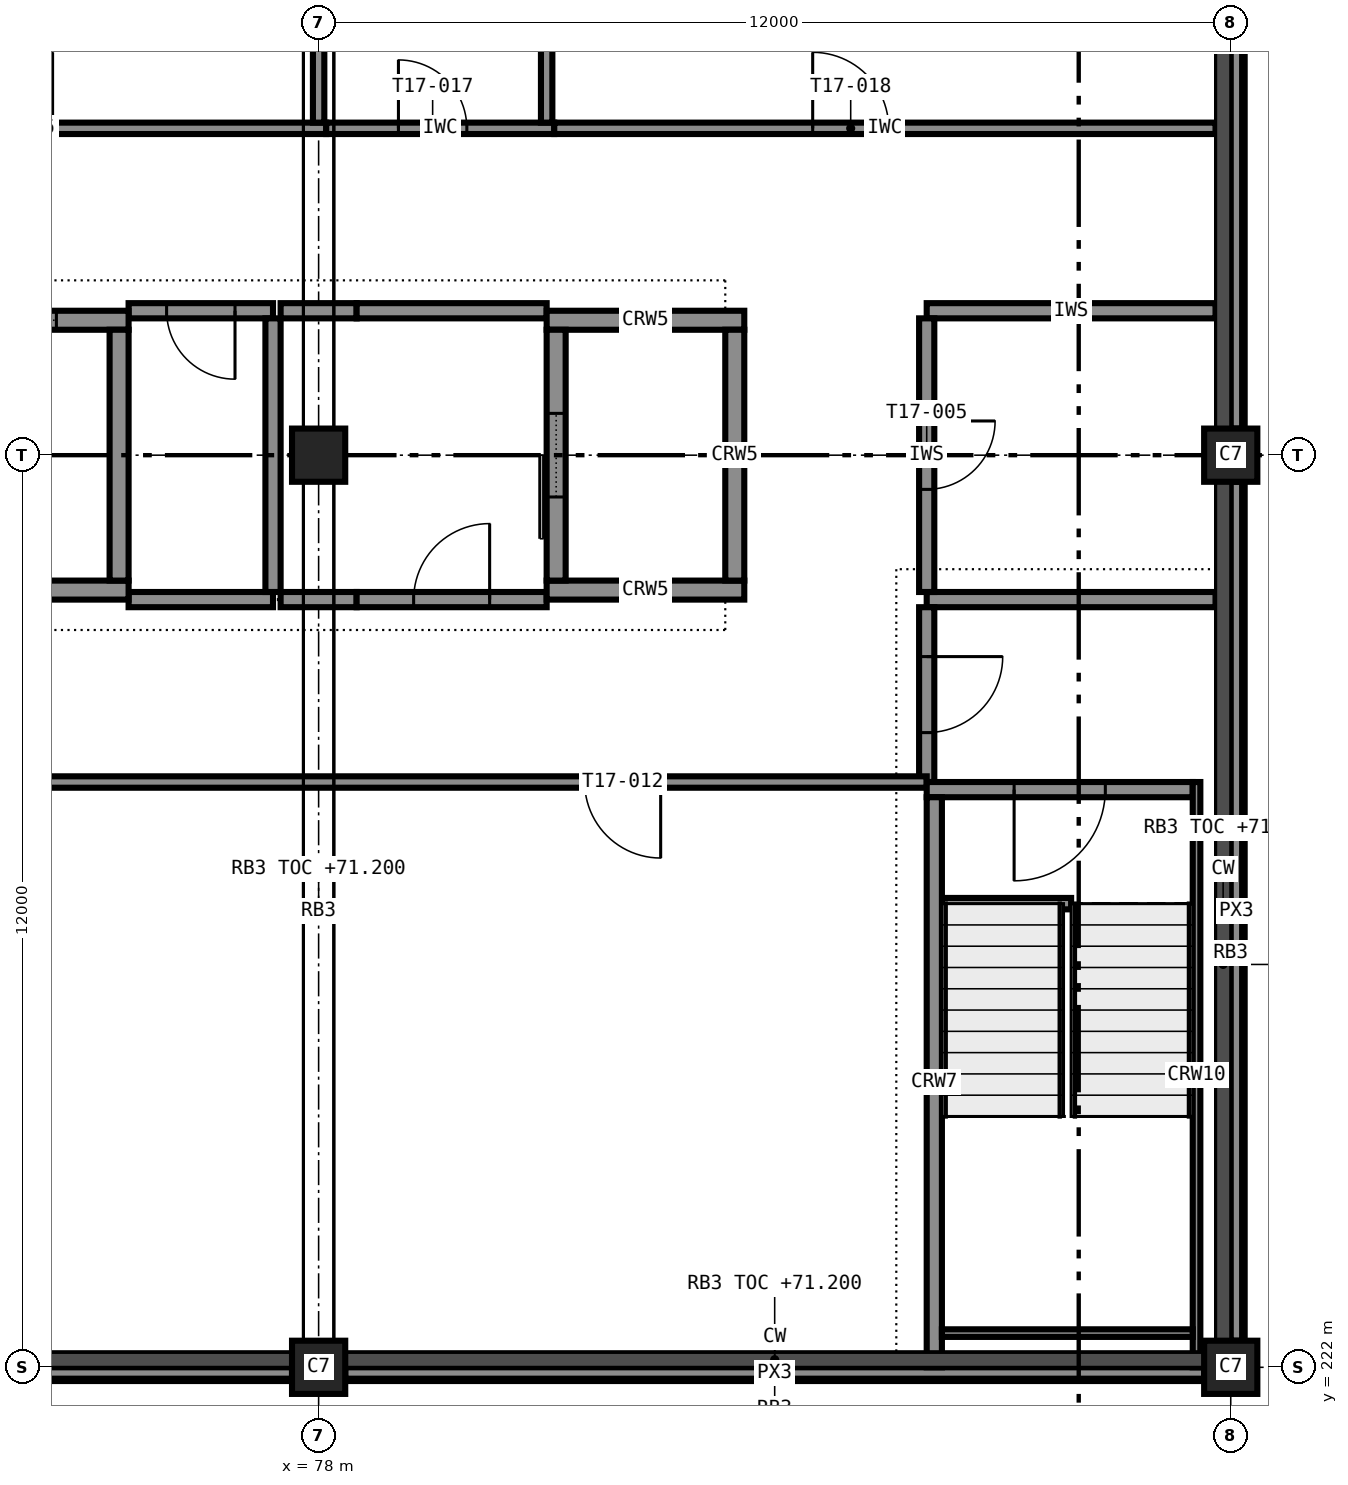
"""IFC4 building model, lengths in metres.
Left out: names, types, materials, properties, quantities, classifications, styles, units other than length and angle.
Written with IfcOpenShell. Run it as: python <this file> out.ifc"""

import sys

from ifc_helpers import new_model, si_unit, direction, frame, frame_2d, origin, origin_2d, place, context, subcontext, project, spatial, rectangle, extrude, element, fill, save


model = new_model("IFC4")
c1 = context("Model", 3, precision=1e-05, world=origin(), true_north=direction((0.0, 1.0)))
c2 = subcontext(c1, "Body", "Model", "MODEL_VIEW")
j1 = project(units=[si_unit("LENGTHUNIT", "METRE"), si_unit("PLANEANGLEUNIT", "RADIAN")], contexts=[c1])
p1 = place(None, origin())
s1 = spatial("IfcSite", under=j1, at=p1, CompositionType="ELEMENT")
p2 = place(p1, origin())
s2 = spatial("IfcBuilding", under=s1, at=p2, CompositionType="ELEMENT")
p3 = place(p2, frame((0.0, 0.0, 67.8)))
s3 = spatial("IfcBuildingStorey", under=s2, at=p3, CompositionType="ELEMENT", Elevation=67.8)
for number, where, z_axis, x_axis in (
    (1, (78.0, 222.0, 0.0), (0.0, 0.0, 1.0), (1.0, 0.0, 0.0)),
    (2, (78.0, 234.0, 0.0), (0.0, 0.0, 1.0), (1.0, 0.0, 0.0)),
    (3, (90.0, 222.0, 0.0), (0.0, 0.0, 1.0), (1.0, 0.0, 0.0)),
    (4, (90.0, 234.0, 0.0), (0.0, 0.0, 1.0), (1.0, 0.0, 0.0)),
):
    element("IfcColumn", number, at=place(p3, frame(where, z_axis=z_axis, x_axis=x_axis)), inside=s3, PredefinedType="COLUMN", context=c2, shape_type="SweptSolid", body=[
        extrude(rectangle(XDim=0.7, YDim=0.7, at=origin_2d()), origin(), (0.0, 0.0, 1.0), 3.6),
    ])
p4 = place(p3, frame((72.5, 232.225, 0.0), z_axis=(0.0, 0.0, 1.0), x_axis=(1.0, 0.0, 0.0)))
e5 = element("IfcWall", 5, at=p4, inside=s3, PredefinedType="SHEAR", context=c2, shape_type="SweptSolid", body=[
    extrude(rectangle(XDim=3.0, YDim=0.25, at=frame_2d((1.5, 0.0))), origin(), (0.0, 0.0, 1.0), 3.6),
])
p5 = place(p3, frame((72.5, 235.775, 0.0), z_axis=(0.0, 0.0, 1.0), x_axis=(1.0, 0.0, 0.0)))
e6 = element("IfcWall", 6, at=p5, inside=s3, PredefinedType="SHEAR", context=c2, shape_type="SweptSolid", body=[
    extrude(rectangle(XDim=3.0, YDim=0.25, at=frame_2d((1.5, 0.0))), origin(), (0.0, 0.0, 1.0), 3.6),
])
p6 = place(p5, frame((0.95, 0.0, 0.0)))
e7 = element("IfcOpeningElement", 7, at=p6, cuts=e6, PredefinedType="OPENING", context=c2, shape_type="SweptSolid", body=[
    extrude(rectangle(XDim=1.1, YDim=2.1, at=frame_2d((0.55, 1.05))), frame((0.0, 0.135, 0.0), z_axis=(0.0, -1.0, 0.0), x_axis=(1.0, 0.0, 0.0)), (0.0, 0.0, 1.0), 0.27),
])
p7 = place(p3, frame((75.375, 232.35, 0.0), z_axis=(0.0, 0.0, 1.0), x_axis=(0.0, 1.0, 0.0)))
e8 = element("IfcWall", 8, at=p7, inside=s3, PredefinedType="SHEAR", context=c2, shape_type="SweptSolid", body=[
    extrude(rectangle(XDim=3.3, YDim=0.25, at=frame_2d((1.65, 0.0))), origin(), (0.0, 0.0, 1.0), 3.6),
])
for number, where, z_axis, x_axis in (
    (9, (81.0, 232.225, 0.0), (0.0, 0.0, 1.0), (1.0, 0.0, 0.0)),
    (10, (81.0, 235.775, 0.0), (0.0, 0.0, 1.0), (1.0, 0.0, 0.0)),
):
    element("IfcWall", number, at=place(p3, frame(where, z_axis=z_axis, x_axis=x_axis)), inside=s3, PredefinedType="SHEAR", context=c2, shape_type="SweptSolid", body=[
        extrude(rectangle(XDim=2.6, YDim=0.25, at=frame_2d((1.3, 0.0))), origin(), (0.0, 0.0, 1.0), 3.6),
    ])
p8 = place(p3, frame((81.125, 232.35, 0.0), z_axis=(0.0, 0.0, 1.0), x_axis=(0.0, 1.0, 0.0)))
e11 = element("IfcWall", 11, at=p8, inside=s3, PredefinedType="SHEAR", context=c2, shape_type="SweptSolid", body=[
    extrude(rectangle(XDim=3.3, YDim=0.25, at=frame_2d((1.65, 0.0))), origin(), (0.0, 0.0, 1.0), 3.6),
])
p9 = place(p8, frame((1.1, 0.0, 0.0)))
e12 = element("IfcOpeningElement", 12, at=p9, cuts=e11, PredefinedType="OPENING", context=c2, shape_type="SweptSolid", body=[
    extrude(rectangle(XDim=1.1, YDim=2.1, at=frame_2d((0.55, 1.05))), frame((0.0, 0.135, 0.0), z_axis=(0.0, -1.0, 0.0), x_axis=(1.0, 0.0, 0.0)), (0.0, 0.0, 1.0), 0.27),
])
p10 = place(p3, frame((83.475, 232.35, 0.0), z_axis=(0.0, 0.0, 1.0), x_axis=(0.0, 1.0, 0.0)))
e13 = element("IfcWall", 13, at=p10, inside=s3, PredefinedType="SHEAR", context=c2, shape_type="SweptSolid", body=[
    extrude(rectangle(XDim=3.3, YDim=0.25, at=frame_2d((1.65, 0.0))), origin(), (0.0, 0.0, 1.0), 3.6),
])
p11 = place(p3, frame((89.5, 229.6, 0.0), z_axis=(0.0, 0.0, 1.0), x_axis=(-1.0, 0.0, 0.0)))
e14 = element("IfcWall", 14, at=p11, inside=s3, PredefinedType="SHEAR", context=c2, shape_type="SweptSolid", body=[
    extrude(rectangle(XDim=3.5, YDim=0.2, at=frame_2d((1.75, 0.0))), origin(), (0.0, 0.0, 1.0), 3.6),
])
p12 = place(p11, frame((1.15, 0.0, 0.0)))
e15 = element("IfcOpeningElement", 15, at=p12, cuts=e14, PredefinedType="OPENING", context=c2, shape_type="SweptSolid", body=[
    extrude(rectangle(XDim=1.2, YDim=2.1, at=frame_2d((0.6, 1.05))), frame((0.0, 0.11, 0.0), z_axis=(0.0, -1.0, 0.0), x_axis=(1.0, 0.0, 0.0)), (0.0, 0.0, 1.0), 0.22),
])
p13 = place(p3, frame((86.1, 222.0, 0.0), z_axis=(0.0, 0.0, 1.0), x_axis=(0.0, 1.0, 0.0)))
e16 = element("IfcWall", 16, at=p13, inside=s3, PredefinedType="SHEAR", context=c2, shape_type="SweptSolid", body=[
    extrude(rectangle(XDim=7.5, YDim=0.2, at=frame_2d((3.75, 0.0))), origin(), (0.0, 0.0, 1.0), 3.6),
])
p14 = place(p3, frame((89.55, 229.7, 0.0), z_axis=(0.0, 0.0, 1.0), x_axis=(0.0, -1.0, 0.0)))
e17 = element("IfcWall", 17, at=p14, inside=s3, PredefinedType="SHEAR", context=c2, shape_type="SweptSolid", body=[
    extrude(rectangle(XDim=7.7, YDim=0.1, at=frame_2d((3.85, 0.0))), origin(), (0.0, 0.0, 1.0), 3.4),
])
p15 = place(p3, frame((89.5, 222.45, 0.0), z_axis=(0.0, 0.0, 1.0), x_axis=(-1.0, 0.0, 0.0)))
e18 = element("IfcWall", 18, at=p15, inside=s3, PredefinedType="SHEAR", context=c2, shape_type="SweptSolid", body=[
    extrude(rectangle(XDim=3.3, YDim=0.1, at=frame_2d((1.65, 0.0))), origin(), (0.0, 0.0, 1.0), 3.4),
])
for number, where, z_axis, x_axis in (
    (19, (66.35, 221.925, 3.4), (0.0, 0.0, 1.0), (1.0, 0.0, 0.0)),
    (20, (78.35, 221.925, 3.4), (0.0, 0.0, 1.0), (1.0, 0.0, 0.0)),
    (21, (90.075, 222.35, 3.4), (0.0, 0.0, 1.0), (0.0, 1.0, 0.0)),
    (22, (90.075, 234.35, 3.4), (0.0, 0.0, 1.0), (0.0, 1.0, 0.0)),
):
    element("IfcWall", number, at=place(p3, frame(where, z_axis=z_axis, x_axis=x_axis)), inside=s3, PredefinedType="STANDARD", context=c2, shape_type="SweptSolid", body=[
        extrude(rectangle(XDim=11.3, YDim=0.15, at=frame_2d((5.65, 0.0))), origin(), (0.0, 0.0, 1.0), 0.2),
    ])
p16 = place(p3, frame((75.5, 232.1, 0.0), z_axis=(0.0, 0.0, 1.0), x_axis=(1.0, 0.0, 0.0)))
e23 = element("IfcWall", 23, at=p16, inside=s3, PredefinedType="PARTITIONING", context=c2, shape_type="SweptSolid", body=[
    extrude(rectangle(XDim=1.9, YDim=0.2, at=frame_2d((0.95, 0.0))), origin(), (0.0, 0.0, 1.0), 3.4),
])
p17 = place(p3, frame((77.5, 232.1, 0.0), z_axis=(0.0, 0.0, 1.0), x_axis=(1.0, 0.0, 0.0)))
e24 = element("IfcWall", 24, at=p17, inside=s3, PredefinedType="PARTITIONING", context=c2, shape_type="SweptSolid", body=[
    extrude(rectangle(XDim=1.0, YDim=0.2, at=frame_2d((0.5, 0.0))), origin(), (0.0, 0.0, 1.0), 3.4),
])
p18 = place(p3, frame((78.5, 232.1, 0.0), z_axis=(0.0, 0.0, 1.0), x_axis=(1.0, 0.0, 0.0)))
e25 = element("IfcWall", 25, at=p18, inside=s3, PredefinedType="PARTITIONING", context=c2, shape_type="SweptSolid", body=[
    extrude(rectangle(XDim=2.5, YDim=0.2, at=frame_2d((1.25, 0.0))), origin(), (0.0, 0.0, 1.0), 3.4),
])
p19 = place(p18, frame((0.75, 0.0, 0.0)))
e26 = element("IfcOpeningElement", 26, at=p19, cuts=e25, PredefinedType="OPENING", context=c2, shape_type="SweptSolid", body=[
    extrude(rectangle(XDim=1.0, YDim=2.1, at=frame_2d((0.5, 1.05))), frame((0.0, 0.11, 0.0), z_axis=(0.0, -1.0, 0.0), x_axis=(1.0, 0.0, 0.0)), (0.0, 0.0, 1.0), 0.22),
])
p20 = place(p3, frame((86.0, 232.1, 0.0), z_axis=(0.0, 0.0, 1.0), x_axis=(1.0, 0.0, 0.0)))
e27 = element("IfcWall", 27, at=p20, inside=s3, PredefinedType="PARTITIONING", context=c2, shape_type="SweptSolid", body=[
    extrude(rectangle(XDim=3.8, YDim=0.2, at=frame_2d((1.9, 0.0))), origin(), (0.0, 0.0, 1.0), 3.4),
])
p21 = place(p3, frame((77.4, 235.9, 0.0), z_axis=(0.0, 0.0, 1.0), x_axis=(-1.0, 0.0, 0.0)))
e28 = element("IfcWall", 28, at=p21, inside=s3, PredefinedType="PARTITIONING", context=c2, shape_type="SweptSolid", body=[
    extrude(rectangle(XDim=1.9, YDim=0.2, at=frame_2d((0.95, 0.0))), origin(), (0.0, 0.0, 1.0), 3.4),
])
p22 = place(p21, frame((0.5, 0.0, 0.0)))
e29 = element("IfcOpeningElement", 29, at=p22, cuts=e28, PredefinedType="OPENING", context=c2, shape_type="SweptSolid", body=[
    extrude(rectangle(XDim=0.9, YDim=2.1, at=frame_2d((0.45, 1.05))), frame((0.0, 0.11, 0.0), z_axis=(0.0, -1.0, 0.0), x_axis=(1.0, 0.0, 0.0)), (0.0, 0.0, 1.0), 0.22),
])
p23 = place(p3, frame((77.5, 235.9, 0.0), z_axis=(0.0, 0.0, 1.0), x_axis=(1.0, 0.0, 0.0)))
e30 = element("IfcWall", 30, at=p23, inside=s3, PredefinedType="PARTITIONING", context=c2, shape_type="SweptSolid", body=[
    extrude(rectangle(XDim=1.0, YDim=0.2, at=frame_2d((0.5, 0.0))), origin(), (0.0, 0.0, 1.0), 3.4),
])
p24 = place(p3, frame((78.5, 235.9, 0.0), z_axis=(0.0, 0.0, 1.0), x_axis=(1.0, 0.0, 0.0)))
e31 = element("IfcWall", 31, at=p24, inside=s3, PredefinedType="PARTITIONING", context=c2, shape_type="SweptSolid", body=[
    extrude(rectangle(XDim=2.5, YDim=0.2, at=frame_2d((1.25, 0.0))), origin(), (0.0, 0.0, 1.0), 3.4),
])
p25 = place(p3, frame((86.0, 235.9, 0.0), z_axis=(0.0, 0.0, 1.0), x_axis=(1.0, 0.0, 0.0)))
e32 = element("IfcWall", 32, at=p25, inside=s3, PredefinedType="PARTITIONING", context=c2, shape_type="SweptSolid", body=[
    extrude(rectangle(XDim=3.8, YDim=0.2, at=frame_2d((1.9, 0.0))), origin(), (0.0, 0.0, 1.0), 3.4),
])
p26 = place(p3, frame((77.4, 232.2, 0.0), z_axis=(0.0, 0.0, 1.0), x_axis=(0.0, 1.0, 0.0)))
e33 = element("IfcWall", 33, at=p26, inside=s3, PredefinedType="PARTITIONING", context=c2, shape_type="SweptSolid", body=[
    extrude(rectangle(XDim=3.6, YDim=0.2, at=frame_2d((1.8, 0.0))), origin(), (0.0, 0.0, 1.0), 3.4),
])
p27 = place(p3, frame((86.0, 235.8, 0.0), z_axis=(0.0, 0.0, 1.0), x_axis=(0.0, -1.0, 0.0)))
e34 = element("IfcWall", 34, at=p27, inside=s3, PredefinedType="PARTITIONING", context=c2, shape_type="SweptSolid", body=[
    extrude(rectangle(XDim=3.6, YDim=0.2, at=frame_2d((1.8, 0.0))), origin(), (0.0, 0.0, 1.0), 3.4),
])
p28 = place(p27, frame((1.35, 0.0, 0.0)))
e35 = element("IfcOpeningElement", 35, at=p28, cuts=e34, PredefinedType="OPENING", context=c2, shape_type="SweptSolid", body=[
    extrude(rectangle(XDim=0.9, YDim=2.1, at=frame_2d((0.45, 1.05))), frame((0.0, 0.11, 0.0), z_axis=(0.0, -1.0, 0.0), x_axis=(1.0, 0.0, 0.0)), (0.0, 0.0, 1.0), 0.22),
])
p29 = place(p3, frame((86.0, 232.0, 0.0), z_axis=(0.0, 0.0, 1.0), x_axis=(0.0, -1.0, 0.0)))
e36 = element("IfcWall", 36, at=p29, inside=s3, PredefinedType="PARTITIONING", context=c2, shape_type="SweptSolid", body=[
    extrude(rectangle(XDim=2.3, YDim=0.2, at=frame_2d((1.15, 0.0))), origin(), (0.0, 0.0, 1.0), 3.4),
])
p30 = place(p29, frame((0.65, 0.0, 0.0)))
e37 = element("IfcOpeningElement", 37, at=p30, cuts=e36, PredefinedType="OPENING", context=c2, shape_type="SweptSolid", body=[
    extrude(rectangle(XDim=1.0, YDim=2.1, at=frame_2d((0.5, 1.05))), frame((0.0, 0.11, 0.0), z_axis=(0.0, -1.0, 0.0), x_axis=(1.0, 0.0, 0.0)), (0.0, 0.0, 1.0), 0.22),
])
p31 = place(p3, frame((86.0, 229.7, 0.0), z_axis=(0.0, 0.0, 1.0), x_axis=(-1.0, 0.0, 0.0)))
e38 = element("IfcWall", 38, at=p31, inside=s3, PredefinedType="PARTITIONING", context=c2, shape_type="SweptSolid", body=[
    extrude(rectangle(XDim=31.9, YDim=0.15, at=frame_2d((15.95, 0.0))), origin(), (0.0, 0.0, 1.0), 3.4),
])
p32 = place(p31, frame((27.5, 0.0, 0.0)))
e39 = element("IfcOpeningElement", 39, at=p32, cuts=e38, PredefinedType="OPENING", context=c2, shape_type="SweptSolid", body=[
    extrude(rectangle(XDim=1.0, YDim=2.1, at=frame_2d((0.5, 1.05))), frame((0.0, 0.085, 0.0), z_axis=(0.0, -1.0, 0.0), x_axis=(1.0, 0.0, 0.0)), (0.0, 0.0, 1.0), 0.17),
])
p33 = place(p31, frame((15.5, 0.0, 0.0)))
e40 = element("IfcOpeningElement", 40, at=p33, cuts=e38, PredefinedType="OPENING", context=c2, shape_type="SweptSolid", body=[
    extrude(rectangle(XDim=1.0, YDim=2.1, at=frame_2d((0.5, 1.05))), frame((0.0, 0.085, 0.0), z_axis=(0.0, -1.0, 0.0), x_axis=(1.0, 0.0, 0.0)), (0.0, 0.0, 1.0), 0.17),
])
p34 = place(p31, frame((3.5, 0.0, 0.0)))
e41 = element("IfcOpeningElement", 41, at=p34, cuts=e38, PredefinedType="OPENING", context=c2, shape_type="SweptSolid", body=[
    extrude(rectangle(XDim=1.0, YDim=2.1, at=frame_2d((0.5, 1.05))), frame((0.0, 0.085, 0.0), z_axis=(0.0, -1.0, 0.0), x_axis=(1.0, 0.0, 0.0)), (0.0, 0.0, 1.0), 0.17),
])
p35 = place(p3, frame((54.1, 238.3, 0.0), z_axis=(0.0, 0.0, 1.0), x_axis=(1.0, 0.0, 0.0)))
e42 = element("IfcWall", 42, at=p35, inside=s3, PredefinedType="PARTITIONING", context=c2, shape_type="SweptSolid", body=[
    extrude(rectangle(XDim=24.0, YDim=0.15, at=frame_2d((12.0, 0.0))), origin(), (0.0, 0.0, 1.0), 3.4),
])
p36 = place(p35, frame((3.4, 0.0, 0.0)))
e43 = element("IfcOpeningElement", 43, at=p36, cuts=e42, PredefinedType="OPENING", context=c2, shape_type="SweptSolid", body=[
    extrude(rectangle(XDim=1.0, YDim=2.1, at=frame_2d((0.5, 1.05))), frame((0.0, 0.085, 0.0), z_axis=(0.0, -1.0, 0.0), x_axis=(1.0, 0.0, 0.0)), (0.0, 0.0, 1.0), 0.17),
])
p37 = place(p35, frame((19.4, 0.0, 0.0)))
e44 = element("IfcOpeningElement", 44, at=p37, cuts=e42, PredefinedType="OPENING", context=c2, shape_type="SweptSolid", body=[
    extrude(rectangle(XDim=1.0, YDim=2.1, at=frame_2d((0.5, 1.05))), frame((0.0, 0.085, 0.0), z_axis=(0.0, -1.0, 0.0), x_axis=(1.0, 0.0, 0.0)), (0.0, 0.0, 1.0), 0.17),
])
p38 = place(p3, frame((78.1, 238.3, 0.0), z_axis=(0.0, 0.0, 1.0), x_axis=(1.0, 0.0, 0.0)))
e45 = element("IfcWall", 45, at=p38, inside=s3, PredefinedType="PARTITIONING", context=c2, shape_type="SweptSolid", body=[
    extrude(rectangle(XDim=3.0, YDim=0.15, at=frame_2d((1.5, 0.0))), origin(), (0.0, 0.0, 1.0), 3.4),
])
p39 = place(p38, frame((0.95, 0.0, 0.0)))
e46 = element("IfcOpeningElement", 46, at=p39, cuts=e45, PredefinedType="OPENING", context=c2, shape_type="SweptSolid", body=[
    extrude(rectangle(XDim=0.9, YDim=2.1, at=frame_2d((0.45, 1.05))), frame((0.0, 0.085, 0.0), z_axis=(0.0, -1.0, 0.0), x_axis=(1.0, 0.0, 0.0)), (0.0, 0.0, 1.0), 0.17),
])
p40 = place(p3, frame((78.0, 245.65, 0.0), z_axis=(0.0, 0.0, 1.0), x_axis=(0.0, -1.0, 0.0)))
e47 = element("IfcWall", 47, at=p40, inside=s3, PredefinedType="PARTITIONING", context=c2, shape_type="SweptSolid", body=[
    extrude(rectangle(XDim=7.275, YDim=0.15, at=frame_2d((3.637, 0.0))), origin(), (0.0, 0.0, 1.0), 2.6),
])
p41 = place(p3, frame((81.1, 238.3, 0.0), z_axis=(0.0, 0.0, 1.0), x_axis=(1.0, 0.0, 0.0)))
e48 = element("IfcWall", 48, at=p41, inside=s3, PredefinedType="PARTITIONING", context=c2, shape_type="SweptSolid", body=[
    extrude(rectangle(XDim=8.7, YDim=0.15, at=frame_2d((4.35, 0.0))), origin(), (0.0, 0.0, 1.0), 3.4),
])
p42 = place(p41, frame((3.4, 0.0, 0.0)))
e49 = element("IfcOpeningElement", 49, at=p42, cuts=e48, PredefinedType="OPENING", context=c2, shape_type="SweptSolid", body=[
    extrude(rectangle(XDim=1.0, YDim=2.1, at=frame_2d((0.5, 1.05))), frame((0.0, 0.085, 0.0), z_axis=(0.0, -1.0, 0.0), x_axis=(1.0, 0.0, 0.0)), (0.0, 0.0, 1.0), 0.17),
])
p43 = place(p3, frame((81.0, 245.8, 0.0), z_axis=(0.0, 0.0, 1.0), x_axis=(0.0, -1.0, 0.0)))
e50 = element("IfcWall", 50, at=p43, inside=s3, PredefinedType="PARTITIONING", context=c2, shape_type="SweptSolid", body=[
    extrude(rectangle(XDim=7.425, YDim=0.15, at=frame_2d((3.712, 0.0))), origin(), (0.0, 0.0, 1.0), 3.4),
])
p44 = place(p3, frame((86.2, 228.1, 3.6), z_axis=(0.0, 0.0, 1.0), x_axis=(1.0, 0.0, 0.0)))
e51 = element("IfcWall", 51, at=p44, inside=s3, PredefinedType="SOLIDWALL", context=c2, shape_type="SweptSolid", body=[
    extrude(rectangle(XDim=1.7, YDim=0.15, at=frame_2d((0.85, 0.0))), origin(), (0.0, 0.0, 1.0), 1.1),
])
p45 = place(p22, origin())
e52 = element("IfcDoor", 52, at=p45, inside=s3, OperationType="SINGLE_SWING_LEFT", PredefinedType="DOOR", context=c2, shape_type="SweptSolid", body=[
    extrude(rectangle(XDim=0.9, YDim=2.1, at=frame_2d((0.45, 1.05))), frame((0.0, 0.025, 0.0), z_axis=(0.0, -1.0, 0.0), x_axis=(1.0, 0.0, 0.0)), (0.0, 0.0, 1.0), 0.05),
])
fill(e29, e52)
p46 = place(p19, origin())
e53 = element("IfcDoor", 53, at=p46, inside=s3, OperationType="SINGLE_SWING_RIGHT", PredefinedType="DOOR", context=c2, shape_type="SweptSolid", body=[
    extrude(rectangle(XDim=1.0, YDim=2.1, at=frame_2d((0.5, 1.05))), frame((0.0, 0.025, 0.0), z_axis=(0.0, -1.0, 0.0), x_axis=(1.0, 0.0, 0.0)), (0.0, 0.0, 1.0), 0.05),
])
fill(e26, e53)
p47 = place(p28, origin())
e54 = element("IfcDoor", 54, at=p47, inside=s3, OperationType="SINGLE_SWING_LEFT", PredefinedType="DOOR", context=c2, shape_type="SweptSolid", body=[
    extrude(rectangle(XDim=0.9, YDim=2.1, at=frame_2d((0.45, 1.05))), frame((0.0, 0.025, 0.0), z_axis=(0.0, -1.0, 0.0), x_axis=(1.0, 0.0, 0.0)), (0.0, 0.0, 1.0), 0.05),
])
fill(e35, e54)
p48 = place(p30, origin())
e55 = element("IfcDoor", 55, at=p48, inside=s3, OperationType="SINGLE_SWING_LEFT", PredefinedType="DOOR", context=c2, shape_type="SweptSolid", body=[
    extrude(rectangle(XDim=1.0, YDim=2.1, at=frame_2d((0.5, 1.05))), frame((0.0, 0.025, 0.0), z_axis=(0.0, -1.0, 0.0), x_axis=(1.0, 0.0, 0.0)), (0.0, 0.0, 1.0), 0.05),
])
fill(e37, e55)
p49 = place(p34, origin())
e56 = element("IfcDoor", 56, at=p49, inside=s3, OperationType="SINGLE_SWING_LEFT", PredefinedType="DOOR", context=c2, shape_type="SweptSolid", body=[
    extrude(rectangle(XDim=1.0, YDim=2.1, at=frame_2d((0.5, 1.05))), frame((0.0, 0.025, 0.0), z_axis=(0.0, -1.0, 0.0), x_axis=(1.0, 0.0, 0.0)), (0.0, 0.0, 1.0), 0.05),
])
fill(e41, e56)
p50 = place(p39, origin())
e57 = element("IfcDoor", 57, at=p50, inside=s3, OperationType="SINGLE_SWING_LEFT", PredefinedType="DOOR", context=c2, shape_type="SweptSolid", body=[
    extrude(rectangle(XDim=0.9, YDim=2.1, at=frame_2d((0.45, 1.05))), frame((0.0, 0.025, 0.0), z_axis=(0.0, -1.0, 0.0), x_axis=(1.0, 0.0, 0.0)), (0.0, 0.0, 1.0), 0.05),
])
fill(e46, e57)
p51 = place(p42, origin())
e58 = element("IfcDoor", 58, at=p51, inside=s3, OperationType="SINGLE_SWING_LEFT", PredefinedType="DOOR", context=c2, shape_type="SweptSolid", body=[
    extrude(rectangle(XDim=1.0, YDim=2.1, at=frame_2d((0.5, 1.05))), frame((0.0, 0.025, 0.0), z_axis=(0.0, -1.0, 0.0), x_axis=(1.0, 0.0, 0.0)), (0.0, 0.0, 1.0), 0.05),
])
fill(e49, e58)
p52 = place(p6, origin())
e59 = element("IfcDoor", 59, at=p52, inside=s3, OperationType="SLIDING_TO_LEFT", PredefinedType="DOOR", context=c2, shape_type="SweptSolid", body=[
    extrude(rectangle(XDim=1.1, YDim=2.1, at=frame_2d((0.55, 1.05))), frame((0.0, 0.025, 0.0), z_axis=(0.0, -1.0, 0.0), x_axis=(1.0, 0.0, 0.0)), (0.0, 0.0, 1.0), 0.05),
])
fill(e7, e59)
p53 = place(p9, origin())
e60 = element("IfcDoor", 60, at=p53, inside=s3, OperationType="SLIDING_TO_LEFT", PredefinedType="DOOR", context=c2, shape_type="SweptSolid", body=[
    extrude(rectangle(XDim=1.1, YDim=2.1, at=frame_2d((0.55, 1.05))), frame((0.0, 0.025, 0.0), z_axis=(0.0, -1.0, 0.0), x_axis=(1.0, 0.0, 0.0)), (0.0, 0.0, 1.0), 0.05),
])
fill(e12, e60)
p54 = place(p12, origin())
e61 = element("IfcDoor", 61, at=p54, inside=s3, OperationType="SINGLE_SWING_RIGHT", PredefinedType="DOOR", context=c2, shape_type="SweptSolid", body=[
    extrude(rectangle(XDim=1.2, YDim=2.1, at=frame_2d((0.6, 1.05))), frame((0.0, 0.025, 0.0), z_axis=(0.0, -1.0, 0.0), x_axis=(1.0, 0.0, 0.0)), (0.0, 0.0, 1.0), 0.05),
])
fill(e15, e61)
save(model, sys.argv[1])
